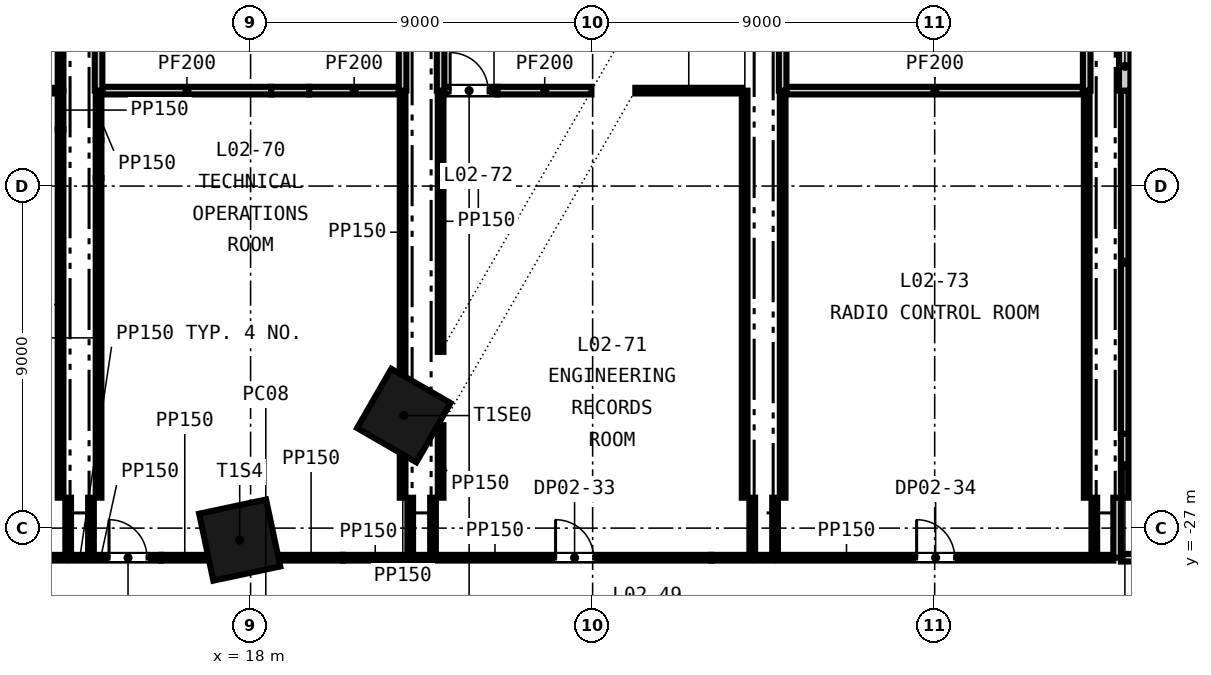
"""IFC4 building model, lengths in metres.
Left out: names, types, materials, properties, quantities, classifications, styles, units other than length and angle.
Written with IfcOpenShell. Run it as: python <this file> out.ifc"""

import sys

from ifc_helpers import new_model, si_unit, direction, frame, frame_2d, origin, origin_2d, place, context, subcontext, project, spatial, rectangle, extrude, element, fill, save


model = new_model("IFC4")
c1 = context("Model", 3, precision=1e-05, world=origin(), true_north=direction((0.0, 1.0)))
c2 = subcontext(c1, "Body", "Model", "MODEL_VIEW")
j1 = project(units=[si_unit("LENGTHUNIT", "METRE"), si_unit("PLANEANGLEUNIT", "RADIAN")], contexts=[c1])
p1 = place(None, origin())
s1 = spatial("IfcSite", under=j1, at=p1, CompositionType="ELEMENT")
p2 = place(p1, origin())
s2 = spatial("IfcBuilding", under=s1, at=p2, CompositionType="ELEMENT")
p3 = place(p2, frame((0.0, 0.0, 18.0)))
s3 = spatial("IfcBuildingStorey", under=s2, at=p3, CompositionType="ELEMENT", Elevation=18.0)
for number, where, z_axis, x_axis in (
    (1, (17.714, -27.315, -0.4), (0.0, 0.0, 1.0), (0.978, 0.208, 0.0)),
    (2, (22.032, -24.039, -0.4), (0.0, 0.0, 1.0), (0.5, 0.866, 0.0)),
):
    element("IfcColumn", number, at=place(p3, frame(where, z_axis=z_axis, x_axis=x_axis)), inside=s3, PredefinedType="COLUMN", context=c2, shape_type="SweptSolid", body=[
        extrude(rectangle(XDim=1.8, YDim=1.8, at=origin_2d()), origin(), (0.0, 0.0, 1.0), 4.6),
    ])
p4 = place(p3, frame((10.887, -27.779, 0.0), z_axis=(0.0, 0.0, 1.0), x_axis=(1.0, 0.0, 0.0)))
e3 = element("IfcWall", 3, at=p4, inside=s3, PredefinedType="PARTITIONING", context=c2, shape_type="SweptSolid", body=[
    extrude(rectangle(XDim=2.238, YDim=0.15, at=frame_2d((1.119, 0.0))), origin(), (0.0, 0.0, 1.0), 4.2),
])
p5 = place(p4, frame((0.65, 0.0, 0.0)))
e4 = element("IfcOpeningElement", 4, at=p5, cuts=e3, PredefinedType="OPENING", context=c2, shape_type="SweptSolid", body=[
    extrude(rectangle(XDim=1.0, YDim=2.1, at=frame_2d((0.5, 1.05))), frame((0.0, 0.085, 0.0), z_axis=(0.0, -1.0, 0.0), x_axis=(1.0, 0.0, 0.0)), (0.0, 0.0, 1.0), 0.17),
])
p6 = place(p3, frame((13.275, -27.779, 0.0), z_axis=(0.0, 0.0, 1.0), x_axis=(1.0, 0.0, 0.0)))
e5 = element("IfcWall", 5, at=p6, inside=s3, PredefinedType="PARTITIONING", context=c2, shape_type="SweptSolid", body=[
    extrude(rectangle(XDim=0.45, YDim=0.15, at=frame_2d((0.225, 0.0))), origin(), (0.0, 0.0, 1.0), 4.2),
])
p7 = place(p3, frame((13.875, -27.779, 0.0), z_axis=(0.0, 0.0, 1.0), x_axis=(1.0, 0.0, 0.0)))
e6 = element("IfcWall", 6, at=p7, inside=s3, PredefinedType="PARTITIONING", context=c2, shape_type="SweptSolid", body=[
    extrude(rectangle(XDim=1.775, YDim=0.15, at=frame_2d((0.887, 0.0))), origin(), (0.0, 0.0, 1.0), 4.2),
])
p8 = place(p7, frame((0.4, 0.0, 0.0)))
e7 = element("IfcOpeningElement", 7, at=p8, cuts=e6, PredefinedType="OPENING", context=c2, shape_type="SweptSolid", body=[
    extrude(rectangle(XDim=1.0, YDim=2.1, at=frame_2d((0.5, 1.05))), frame((0.0, 0.085, 0.0), z_axis=(0.0, -1.0, 0.0), x_axis=(1.0, 0.0, 0.0)), (0.0, 0.0, 1.0), 0.17),
])
p9 = place(p3, frame((15.65, -27.779, 0.0), z_axis=(0.0, 0.0, 1.0), x_axis=(1.0, 0.0, 0.0)))
e8 = element("IfcWall", 8, at=p9, inside=s3, PredefinedType="PARTITIONING", context=c2, shape_type="SweptSolid", body=[
    extrude(rectangle(XDim=1.227, YDim=0.15, at=frame_2d((0.613, 0.0))), origin(), (0.0, 0.0, 1.0), 3.2),
])
p10 = place(p3, frame((18.748, -27.779, 0.0), z_axis=(0.0, 0.0, 1.0), x_axis=(1.0, 0.0, 0.0)))
e9 = element("IfcWall", 9, at=p10, inside=s3, PredefinedType="PARTITIONING", context=c2, shape_type="SweptSolid", body=[
    extrude(rectangle(XDim=1.676, YDim=0.15, at=frame_2d((0.838, 0.0))), origin(), (0.0, 0.0, 1.0), 4.2),
])
p11 = place(p3, frame((20.425, -27.779, 0.0), z_axis=(0.0, 0.0, 1.0), x_axis=(1.0, 0.0, 0.0)))
e10 = element("IfcWall", 10, at=p11, inside=s3, PredefinedType="PARTITIONING", context=c2, shape_type="SweptSolid", body=[
    extrude(rectangle(XDim=1.7, YDim=0.15, at=frame_2d((0.85, 0.0))), origin(), (0.0, 0.0, 1.0), 3.111),
])
p12 = place(p3, frame((22.275, -27.779, 0.0), z_axis=(0.0, 0.0, 1.0), x_axis=(1.0, 0.0, 0.0)))
e11 = element("IfcWall", 11, at=p12, inside=s3, PredefinedType="PARTITIONING", context=c2, shape_type="SweptSolid", body=[
    extrude(rectangle(XDim=0.45, YDim=0.15, at=frame_2d((0.225, 0.0))), origin(), (0.0, 0.0, 1.0), 4.2),
])
p13 = place(p3, frame((22.875, -27.779, 0.0), z_axis=(0.0, 0.0, 1.0), x_axis=(1.0, 0.0, 0.0)))
e12 = element("IfcWall", 12, at=p13, inside=s3, PredefinedType="PARTITIONING", context=c2, shape_type="SweptSolid", body=[
    extrude(rectangle(XDim=7.25, YDim=0.15, at=frame_2d((3.625, 0.0))), origin(), (0.0, 0.0, 1.0), 4.2),
])
p14 = place(p13, frame((3.15, 0.0, 0.0)))
e13 = element("IfcOpeningElement", 13, at=p14, cuts=e12, PredefinedType="OPENING", context=c2, shape_type="SweptSolid", body=[
    extrude(rectangle(XDim=1.0, YDim=2.1, at=frame_2d((0.5, 1.05))), frame((0.0, 0.085, 0.0), z_axis=(0.0, -1.0, 0.0), x_axis=(1.0, 0.0, 0.0)), (0.0, 0.0, 1.0), 0.17),
])
p15 = place(p3, frame((30.125, -27.779, 0.0), z_axis=(0.0, 0.0, 1.0), x_axis=(1.0, 0.0, 0.0)))
e14 = element("IfcWall", 14, at=p15, inside=s3, PredefinedType="PARTITIONING", context=c2, shape_type="SweptSolid", body=[
    extrude(rectangle(XDim=1.0, YDim=0.15, at=frame_2d((0.5, 0.0))), origin(), (0.0, 0.0, 1.0), 3.111),
])
p16 = place(p3, frame((31.275, -27.779, 0.0), z_axis=(0.0, 0.0, 1.0), x_axis=(1.0, 0.0, 0.0)))
e15 = element("IfcWall", 15, at=p16, inside=s3, PredefinedType="PARTITIONING", context=c2, shape_type="SweptSolid", body=[
    extrude(rectangle(XDim=0.45, YDim=0.15, at=frame_2d((0.225, 0.0))), origin(), (0.0, 0.0, 1.0), 4.2),
])
p17 = place(p3, frame((31.875, -27.779, 0.0), z_axis=(0.0, 0.0, 1.0), x_axis=(1.0, 0.0, 0.0)))
e16 = element("IfcWall", 16, at=p17, inside=s3, PredefinedType="PARTITIONING", context=c2, shape_type="SweptSolid", body=[
    extrude(rectangle(XDim=8.25, YDim=0.15, at=frame_2d((4.125, 0.0))), origin(), (0.0, 0.0, 1.0), 4.2),
])
p18 = place(p17, frame((3.65, 0.0, 0.0)))
e17 = element("IfcOpeningElement", 17, at=p18, cuts=e16, PredefinedType="OPENING", context=c2, shape_type="SweptSolid", body=[
    extrude(rectangle(XDim=1.0, YDim=2.1, at=frame_2d((0.5, 1.05))), frame((0.0, 0.085, 0.0), z_axis=(0.0, -1.0, 0.0), x_axis=(1.0, 0.0, 0.0)), (0.0, 0.0, 1.0), 0.17),
])
p19 = place(p3, frame((40.275, -27.779, 0.0), z_axis=(0.0, 0.0, 1.0), x_axis=(1.0, 0.0, 0.0)))
e18 = element("IfcWall", 18, at=p19, inside=s3, PredefinedType="PARTITIONING", context=c2, shape_type="SweptSolid", body=[
    extrude(rectangle(XDim=0.425, YDim=0.15, at=frame_2d((0.212, 0.0))), origin(), (0.0, 0.0, 1.0), 4.2),
])
p20 = place(p3, frame((40.9, -27.779, 0.0), z_axis=(0.0, 0.0, 1.0), x_axis=(1.0, 0.0, 0.0)))
e19 = element("IfcWall", 19, at=p20, inside=s3, PredefinedType="PARTITIONING", context=c2, shape_type="SweptSolid", body=[
    extrude(rectangle(XDim=3.4, YDim=0.2, at=frame_2d((1.7, 0.0))), origin(), (0.0, 0.0, 1.0), 4.2),
])
p21 = place(p20, frame((1.15, 0.0, 0.0)))
e20 = element("IfcOpeningElement", 20, at=p21, cuts=e19, PredefinedType="OPENING", context=c2, shape_type="SweptSolid", body=[
    extrude(rectangle(XDim=1.0, YDim=2.1, at=frame_2d((0.5, 1.05))), frame((0.0, 0.11, 0.0), z_axis=(0.0, -1.0, 0.0), x_axis=(1.0, 0.0, 0.0)), (0.0, 0.0, 1.0), 0.22),
])
p22 = place(p3, frame((9.03, -15.489, 0.0), z_axis=(0.0, 0.0, 1.0), x_axis=(1.0, 0.0, 0.0)))
e21 = element("IfcWall", 21, at=p22, inside=s3, PredefinedType="PARTITIONING", context=c2, shape_type="SweptSolid", body=[
    extrude(rectangle(XDim=3.895, YDim=0.15, at=frame_2d((1.948, 0.0))), origin(), (0.0, 0.0, 1.0), 4.2),
])
p23 = place(p3, frame((14.1, -15.489, 0.0), z_axis=(0.0, 0.0, 1.0), x_axis=(1.0, 0.0, 0.0)))
e22 = element("IfcWall", 22, at=p23, inside=s3, PredefinedType="PARTITIONING", context=c2, shape_type="SweptSolid", body=[
    extrude(rectangle(XDim=4.44, YDim=0.2, at=frame_2d((2.22, 0.0))), origin(), (0.0, 0.0, 1.0), 4.2),
])
p24 = place(p3, frame((18.541, -15.489, 0.0), z_axis=(0.0, 0.0, 1.0), x_axis=(1.0, 0.0, 0.0)))
e23 = element("IfcWall", 23, at=p24, inside=s3, PredefinedType="PARTITIONING", context=c2, shape_type="SweptSolid", body=[
    extrude(rectangle(XDim=1.0, YDim=0.2, at=frame_2d((0.5, 0.0))), origin(), (0.0, 0.0, 1.0), 3.6),
])
p25 = place(p3, frame((19.541, -15.489, 0.0), z_axis=(0.0, 0.0, 1.0), x_axis=(1.0, 0.0, 0.0)))
e24 = element("IfcWall", 24, at=p25, inside=s3, PredefinedType="PARTITIONING", context=c2, shape_type="SweptSolid", body=[
    extrude(rectangle(XDim=2.359, YDim=0.2, at=frame_2d((1.18, 0.0))), origin(), (0.0, 0.0, 1.0), 4.2),
])
p26 = place(p3, frame((23.1, -15.489, 0.0), z_axis=(0.0, 0.0, 1.0), x_axis=(1.0, 0.0, 0.0)))
e25 = element("IfcWall", 25, at=p26, inside=s3, PredefinedType="PARTITIONING", context=c2, shape_type="SweptSolid", body=[
    extrude(rectangle(XDim=1.4, YDim=0.2, at=frame_2d((0.7, 0.0))), origin(), (0.0, 0.0, 1.0), 3.111),
])
p27 = place(p26, frame((0.15, 0.0, 0.0)))
e26 = element("IfcOpeningElement", 26, at=p27, cuts=e25, PredefinedType="OPENING", context=c2, shape_type="SweptSolid", body=[
    extrude(rectangle(XDim=1.0, YDim=2.1, at=frame_2d((0.5, 1.05))), frame((0.0, 0.11, 0.0), z_axis=(0.0, -1.0, 0.0), x_axis=(1.0, 0.0, 0.0)), (0.0, 0.0, 1.0), 0.22),
])
p28 = place(p3, frame((24.5, -15.489, 0.0), z_axis=(0.0, 0.0, 1.0), x_axis=(1.0, 0.0, 0.0)))
e27 = element("IfcWall", 27, at=p28, inside=s3, PredefinedType="PARTITIONING", context=c2, shape_type="SweptSolid", body=[
    extrude(rectangle(XDim=2.468, YDim=0.2, at=frame_2d((1.234, 0.0))), origin(), (0.0, 0.0, 1.0), 4.2),
])
p29 = place(p3, frame((28.123, -15.489, 0.0), z_axis=(0.0, 0.0, 1.0), x_axis=(1.0, 0.0, 0.0)))
e28 = element("IfcWall", 28, at=p29, inside=s3, PredefinedType="PARTITIONING", context=c2, shape_type="SweptSolid", body=[
    extrude(rectangle(XDim=2.802, YDim=0.15, at=frame_2d((1.401, 0.0))), origin(), (0.0, 0.0, 1.0), 4.2),
])
p30 = place(p3, frame((32.1, -15.489, 0.0), z_axis=(0.0, 0.0, 1.0), x_axis=(1.0, 0.0, 0.0)))
e29 = element("IfcWall", 29, at=p30, inside=s3, PredefinedType="PARTITIONING", context=c2, shape_type="SweptSolid", body=[
    extrude(rectangle(XDim=7.8, YDim=0.2, at=frame_2d((3.9, 0.0))), origin(), (0.0, 0.0, 1.0), 4.2),
])
p31 = place(p3, frame((41.15, -15.489, 0.0), z_axis=(0.0, 0.0, 1.0), x_axis=(1.0, 0.0, 0.0)))
e30 = element("IfcWall", 30, at=p31, inside=s3, PredefinedType="PARTITIONING", context=c2, shape_type="SweptSolid", body=[
    extrude(rectangle(XDim=1.967, YDim=0.2, at=frame_2d((0.983, 0.0))), origin(), (0.0, 0.0, 1.0), 3.597),
])
p32 = place(p3, frame((13.0, -26.2, 0.0), z_axis=(0.0, 0.0, 1.0), x_axis=(0.0, 1.0, 0.0)))
e31 = element("IfcWall", 31, at=p32, inside=s3, PredefinedType="PARTITIONING", context=c2, shape_type="SweptSolid", body=[
    extrude(rectangle(XDim=9.689, YDim=0.15, at=frame_2d((4.844, 0.0))), origin(), (0.0, 0.0, 1.0), 4.2),
])
p33 = place(p3, frame((13.0, -16.511, 0.0), z_axis=(0.0, 0.0, 1.0), x_axis=(0.0, 1.0, 0.0)))
e32 = element("IfcWall", 32, at=p33, inside=s3, PredefinedType="PARTITIONING", context=c2, shape_type="SweptSolid", body=[
    extrude(rectangle(XDim=1.021, YDim=0.15, at=frame_2d((0.51, 0.0))), origin(), (0.0, 0.0, 1.0), 3.797),
])
p34 = place(p3, frame((13.0, -15.489, 0.0), z_axis=(0.0, 0.0, 1.0), x_axis=(0.0, 1.0, 0.0)))
e33 = element("IfcWall", 33, at=p34, inside=s3, PredefinedType="PARTITIONING", context=c2, shape_type="SweptSolid", body=[
    extrude(rectangle(XDim=5.688, YDim=0.15, at=frame_2d((2.844, 0.0))), origin(), (0.0, 0.0, 1.0), 4.2),
])
for number, where, z_axis, x_axis in (
    (34, (13.2, -27.778, 0.0), (0.0, 0.0, 1.0), (0.0, 1.0, 0.0)),
    (35, (13.8, -27.778, 0.0), (0.0, 0.0, 1.0), (0.0, 1.0, 0.0)),
):
    element("IfcWall", number, at=place(p3, frame(where, z_axis=z_axis, x_axis=x_axis)), inside=s3, PredefinedType="PARTITIONING", context=c2, shape_type="SweptSolid", body=[
        extrude(rectangle(XDim=1.578, YDim=0.15, at=frame_2d((0.789, 0.0))), origin(), (0.0, 0.0, 1.0), 4.2),
    ])
p35 = place(p3, frame((14.0, -26.2, 0.0), z_axis=(0.0, 0.0, 1.0), x_axis=(0.0, 1.0, 0.0)))
e36 = element("IfcWall", 36, at=p35, inside=s3, PredefinedType="PARTITIONING", context=c2, shape_type="SweptSolid", body=[
    extrude(rectangle(XDim=8.411, YDim=0.15, at=frame_2d((4.206, 0.0))), origin(), (0.0, 0.0, 1.0), 4.2),
])
p36 = place(p3, frame((14.0, -17.789, 0.0), z_axis=(0.0, 0.0, 1.0), x_axis=(0.0, 1.0, 0.0)))
e37 = element("IfcWall", 37, at=p36, inside=s3, PredefinedType="PARTITIONING", context=c2, shape_type="SweptSolid", body=[
    extrude(rectangle(XDim=1.0, YDim=0.15, at=frame_2d((0.5, 0.0))), origin(), (0.0, 0.0, 1.0), 3.111),
])
p37 = place(p3, frame((14.0, -16.789, 0.0), z_axis=(0.0, 0.0, 1.0), x_axis=(0.0, 1.0, 0.0)))
e38 = element("IfcWall", 38, at=p37, inside=s3, PredefinedType="PARTITIONING", context=c2, shape_type="SweptSolid", body=[
    extrude(rectangle(XDim=1.298, YDim=0.15, at=frame_2d((0.649, 0.0))), origin(), (0.0, 0.0, 1.0), 4.2),
])
p38 = place(p3, frame((14.0, -15.489, 0.0), z_axis=(0.0, 0.0, 1.0), x_axis=(0.0, 1.0, 0.0)))
e39 = element("IfcWall", 39, at=p38, inside=s3, PredefinedType="PARTITIONING", context=c2, shape_type="SweptSolid", body=[
    extrude(rectangle(XDim=4.607, YDim=0.2, at=frame_2d((2.303, 0.0))), origin(), (0.0, 0.0, 1.0), 4.2),
])
p39 = place(p3, frame((22.0, -26.2, 0.0), z_axis=(0.0, 0.0, 1.0), x_axis=(0.0, 1.0, 0.0)))
e40 = element("IfcWall", 40, at=p39, inside=s3, PredefinedType="PARTITIONING", context=c2, shape_type="SweptSolid", body=[
    extrude(rectangle(XDim=1.098, YDim=0.15, at=frame_2d((0.549, 0.0))), origin(), (0.0, 0.0, 1.0), 4.2),
])
p40 = place(p3, frame((22.0, -22.938, 0.0), z_axis=(0.0, 0.0, 1.0), x_axis=(0.0, 1.0, 0.0)))
e41 = element("IfcWall", 41, at=p40, inside=s3, PredefinedType="PARTITIONING", context=c2, shape_type="SweptSolid", body=[
    extrude(rectangle(XDim=7.447, YDim=0.15, at=frame_2d((3.724, 0.0))), origin(), (0.0, 0.0, 1.0), 4.2),
])
p41 = place(p3, frame((22.0, -15.489, 0.0), z_axis=(0.0, 0.0, 1.0), x_axis=(0.0, 1.0, 0.0)))
e42 = element("IfcWall", 42, at=p41, inside=s3, PredefinedType="PARTITIONING", context=c2, shape_type="SweptSolid", body=[
    extrude(rectangle(XDim=3.775, YDim=0.2, at=frame_2d((1.887, 0.0))), origin(), (0.0, 0.0, 1.0), 4.2),
])
for number, where, z_axis, x_axis in (
    (43, (22.2, -27.778, 0.0), (0.0, 0.0, 1.0), (0.0, 1.0, 0.0)),
    (44, (22.8, -27.778, 0.0), (0.0, 0.0, 1.0), (0.0, 1.0, 0.0)),
):
    element("IfcWall", number, at=place(p3, frame(where, z_axis=z_axis, x_axis=x_axis)), inside=s3, PredefinedType="PARTITIONING", context=c2, shape_type="SweptSolid", body=[
        extrude(rectangle(XDim=1.578, YDim=0.15, at=frame_2d((0.789, 0.0))), origin(), (0.0, 0.0, 1.0), 4.2),
    ])
p42 = place(p3, frame((23.0, -26.2, 0.0), z_axis=(0.0, 0.0, 1.0), x_axis=(0.0, 1.0, 0.0)))
e45 = element("IfcWall", 45, at=p42, inside=s3, PredefinedType="PARTITIONING", context=c2, shape_type="SweptSolid", body=[
    extrude(rectangle(XDim=1.907, YDim=0.15, at=frame_2d((0.954, 0.0))), origin(), (0.0, 0.0, 1.0), 4.2),
])
p43 = place(p3, frame((23.0, -22.363, 0.0), z_axis=(0.0, 0.0, 1.0), x_axis=(0.0, 1.0, 0.0)))
e46 = element("IfcWall", 46, at=p43, inside=s3, PredefinedType="PARTITIONING", context=c2, shape_type="SweptSolid", body=[
    extrude(rectangle(XDim=6.872, YDim=0.15, at=frame_2d((3.436, 0.0))), origin(), (0.0, 0.0, 1.0), 4.2),
])
p44 = place(p3, frame((23.0, -15.489, 0.0), z_axis=(0.0, 0.0, 1.0), x_axis=(0.0, 1.0, 0.0)))
e47 = element("IfcWall", 47, at=p44, inside=s3, PredefinedType="PARTITIONING", context=c2, shape_type="SweptSolid", body=[
    extrude(rectangle(XDim=5.688, YDim=0.2, at=frame_2d((2.844, 0.0))), origin(), (0.0, 0.0, 1.0), 4.2),
])
p45 = place(p3, frame((31.0, -26.2, 0.0), z_axis=(0.0, 0.0, 1.0), x_axis=(0.0, 1.0, 0.0)))
e48 = element("IfcWall", 48, at=p45, inside=s3, PredefinedType="PARTITIONING", context=c2, shape_type="SweptSolid", body=[
    extrude(rectangle(XDim=10.71, YDim=0.15, at=frame_2d((5.355, 0.0))), origin(), (0.0, 0.0, 1.0), 4.2),
])
for number, where, z_axis, x_axis in (
    (49, (31.2, -27.778, 0.0), (0.0, 0.0, 1.0), (0.0, 1.0, 0.0)),
    (50, (31.8, -27.778, 0.0), (0.0, 0.0, 1.0), (0.0, 1.0, 0.0)),
):
    element("IfcWall", number, at=place(p3, frame(where, z_axis=z_axis, x_axis=x_axis)), inside=s3, PredefinedType="PARTITIONING", context=c2, shape_type="SweptSolid", body=[
        extrude(rectangle(XDim=1.578, YDim=0.15, at=frame_2d((0.789, 0.0))), origin(), (0.0, 0.0, 1.0), 4.2),
    ])
p46 = place(p3, frame((32.0, -26.2, 0.0), z_axis=(0.0, 0.0, 1.0), x_axis=(0.0, 1.0, 0.0)))
e51 = element("IfcWall", 51, at=p46, inside=s3, PredefinedType="PARTITIONING", context=c2, shape_type="SweptSolid", body=[
    extrude(rectangle(XDim=10.709, YDim=0.15, at=frame_2d((5.355, 0.0))), origin(), (0.0, 0.0, 1.0), 4.2),
])
p47 = place(p3, frame((32.0, -15.489, 0.0), z_axis=(0.0, 0.0, 1.0), x_axis=(0.0, 1.0, 0.0)))
e52 = element("IfcWall", 52, at=p47, inside=s3, PredefinedType="PARTITIONING", context=c2, shape_type="SweptSolid", body=[
    extrude(rectangle(XDim=5.688, YDim=0.2, at=frame_2d((2.844, 0.0))), origin(), (0.0, 0.0, 1.0), 4.2),
])
p48 = place(p3, frame((40.0, -26.2, 0.0), z_axis=(0.0, 0.0, 1.0), x_axis=(0.0, 1.0, 0.0)))
e53 = element("IfcWall", 53, at=p48, inside=s3, PredefinedType="PARTITIONING", context=c2, shape_type="SweptSolid", body=[
    extrude(rectangle(XDim=10.709, YDim=0.15, at=frame_2d((5.355, 0.0))), origin(), (0.0, 0.0, 1.0), 4.2),
])
p49 = place(p3, frame((40.0, -15.489, 0.0), z_axis=(0.0, 0.0, 1.0), x_axis=(0.0, 1.0, 0.0)))
e54 = element("IfcWall", 54, at=p49, inside=s3, PredefinedType="PARTITIONING", context=c2, shape_type="SweptSolid", body=[
    extrude(rectangle(XDim=5.688, YDim=0.2, at=frame_2d((2.844, 0.0))), origin(), (0.0, 0.0, 1.0), 4.2),
])
p50 = place(p3, frame((40.2, -27.778, 0.0), z_axis=(0.0, 0.0, 1.0), x_axis=(0.0, 1.0, 0.0)))
e55 = element("IfcWall", 55, at=p50, inside=s3, PredefinedType="PARTITIONING", context=c2, shape_type="SweptSolid", body=[
    extrude(rectangle(XDim=1.578, YDim=0.15, at=frame_2d((0.789, 0.0))), origin(), (0.0, 0.0, 1.0), 4.2),
])
p51 = place(p3, frame((40.8, -27.778, 0.0), z_axis=(0.0, 0.0, 1.0), x_axis=(0.0, 1.0, 0.0)))
e56 = element("IfcWall", 56, at=p51, inside=s3, PredefinedType="PARTITIONING", context=c2, shape_type="SweptSolid", body=[
    extrude(rectangle(XDim=1.578, YDim=0.2, at=frame_2d((0.789, 0.0))), origin(), (0.0, 0.0, 1.0), 4.2),
])
p52 = place(p3, frame((41.0, -26.2, 0.0), z_axis=(0.0, 0.0, 1.0), x_axis=(0.0, 1.0, 0.0)))
e57 = element("IfcWall", 57, at=p52, inside=s3, PredefinedType="PARTITIONING", context=c2, shape_type="SweptSolid", body=[
    extrude(rectangle(XDim=1.682, YDim=0.2, at=frame_2d((0.841, 0.0))), origin(), (0.0, 0.0, 1.0), 3.597),
])
p53 = place(p3, frame((41.0, -24.518, 0.0), z_axis=(0.0, 0.0, 1.0), x_axis=(0.0, 1.0, 0.0)))
e58 = element("IfcWall", 58, at=p53, inside=s3, PredefinedType="PARTITIONING", context=c2, shape_type="SweptSolid", body=[
    extrude(rectangle(XDim=9.028, YDim=0.2, at=frame_2d((4.514, 0.0))), origin(), (0.0, 0.0, 1.0), 4.2),
])
p54 = place(p3, frame((41.0, -15.489, 0.0), z_axis=(0.0, 0.0, 1.0), x_axis=(0.0, 1.0, 0.0)))
e59 = element("IfcWall", 59, at=p54, inside=s3, PredefinedType="PARTITIONING", context=c2, shape_type="SweptSolid", body=[
    extrude(rectangle(XDim=1.278, YDim=0.3, at=frame_2d((0.639, 0.0))), origin(), (0.0, 0.0, 1.0), 3.597),
])
p55 = place(p8, origin())
e60 = element("IfcDoor", 60, at=p55, inside=s3, OperationType="SINGLE_SWING_LEFT", PredefinedType="DOOR", context=c2, shape_type="SweptSolid", body=[
    extrude(rectangle(XDim=1.0, YDim=2.1, at=frame_2d((0.5, 1.05))), frame((0.0, 0.025, 0.0), z_axis=(0.0, -1.0, 0.0), x_axis=(1.0, 0.0, 0.0)), (0.0, 0.0, 1.0), 0.05),
])
fill(e7, e60)
p56 = place(p14, origin())
e61 = element("IfcDoor", 61, at=p56, inside=s3, OperationType="SINGLE_SWING_LEFT", PredefinedType="DOOR", context=c2, shape_type="SweptSolid", body=[
    extrude(rectangle(XDim=1.0, YDim=2.1, at=frame_2d((0.5, 1.05))), frame((0.0, 0.025, 0.0), z_axis=(0.0, -1.0, 0.0), x_axis=(1.0, 0.0, 0.0)), (0.0, 0.0, 1.0), 0.05),
])
fill(e13, e61)
p57 = place(p18, origin())
e62 = element("IfcDoor", 62, at=p57, inside=s3, OperationType="SINGLE_SWING_LEFT", PredefinedType="DOOR", context=c2, shape_type="SweptSolid", body=[
    extrude(rectangle(XDim=1.0, YDim=2.1, at=frame_2d((0.5, 1.05))), frame((0.0, 0.025, 0.0), z_axis=(0.0, -1.0, 0.0), x_axis=(1.0, 0.0, 0.0)), (0.0, 0.0, 1.0), 0.05),
])
fill(e17, e62)
p58 = place(p27, origin())
e63 = element("IfcDoor", 63, at=p58, inside=s3, OperationType="SINGLE_SWING_LEFT", PredefinedType="DOOR", context=c2, shape_type="SweptSolid", body=[
    extrude(rectangle(XDim=1.0, YDim=2.1, at=frame_2d((0.5, 1.05))), frame((0.0, 0.025, 0.0), z_axis=(0.0, -1.0, 0.0), x_axis=(1.0, 0.0, 0.0)), (0.0, 0.0, 1.0), 0.05),
])
fill(e26, e63)
save(model, sys.argv[1])
